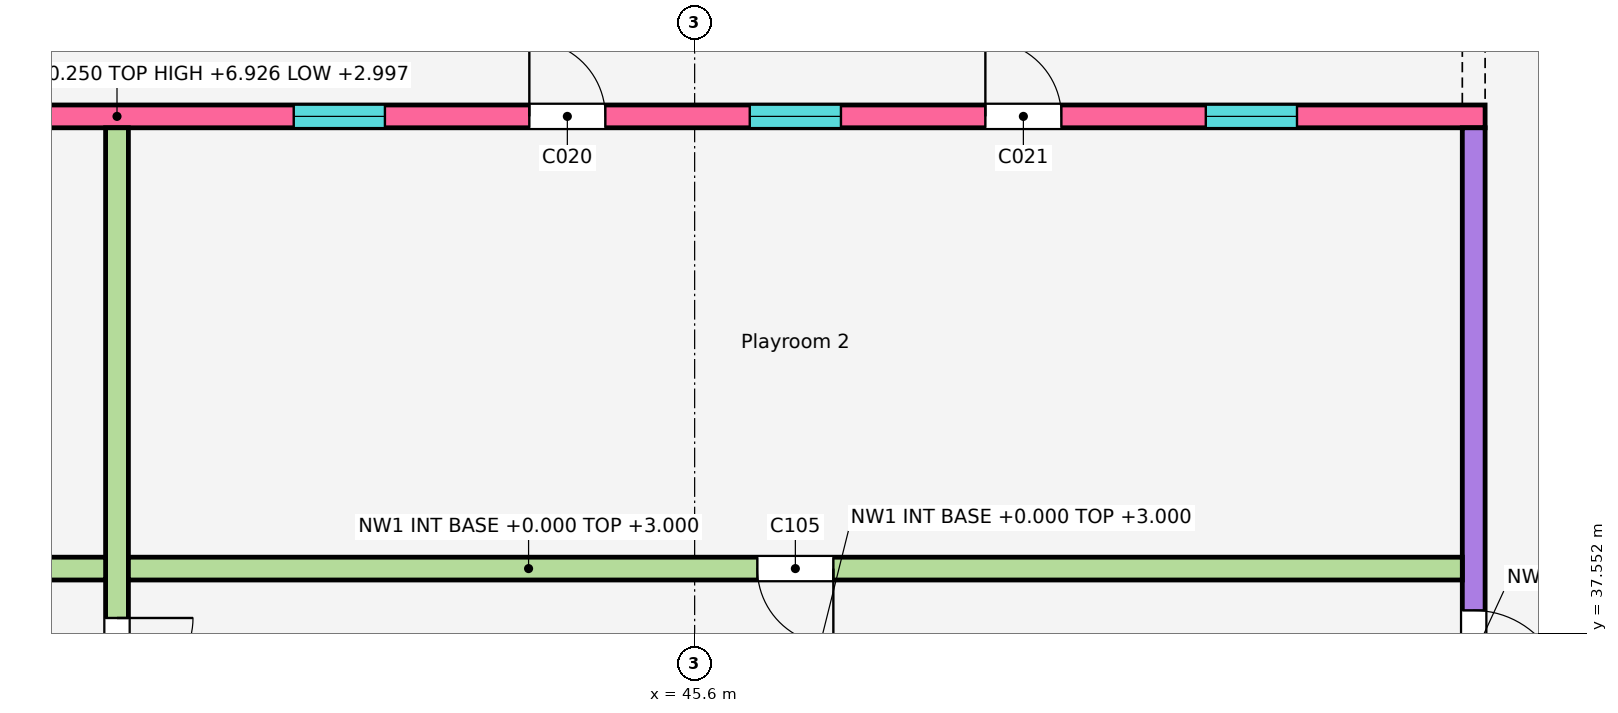
"""IFC4 building model, lengths in metres.
Left out: names, types, materials, properties, quantities, classifications, styles, units other than length and angle.
Written with IfcOpenShell. Run it as: python <this file> out.ifc"""

import sys

from ifc_helpers import new_model, si_unit, direction, frame, frame_2d, origin, place, context, subcontext, project, spatial, polyline, rectangle, outline, extrude, element, fill, save


model = new_model("IFC4")
c1 = context("Model", 3, precision=1e-05, world=origin(), true_north=direction((0.0, 1.0)))
c2 = subcontext(c1, "Body", "Model", "MODEL_VIEW")
j1 = project(units=[si_unit("LENGTHUNIT", "METRE"), si_unit("PLANEANGLEUNIT", "RADIAN")], contexts=[c1])
p1 = place(None, origin())
s1 = spatial("IfcSite", under=j1, at=p1, CompositionType="ELEMENT")
p2 = place(p1, origin())
s2 = spatial("IfcBuilding", under=s1, at=p2, CompositionType="ELEMENT")
p3 = place(p2, origin())
s3 = spatial("IfcBuildingStorey", under=s2, at=p3, CompositionType="ELEMENT", Elevation=0.0)
p4 = place(p3, frame((20.0, 44.35, -0.25), z_axis=(0.0, 0.0, 1.0), x_axis=(1.0, 0.0, 0.0)))
e1 = element("IfcWall", 1, at=p4, inside=s3, PredefinedType="SOLIDWALL", context=c2, shape_type="SweptSolid", body=[
    extrude(outline(polyline([(0.0, 0.0), (36.0, 0.0), (36.0, 3.247), (35.85, 3.247), (27.425, 7.176), (26.425, 7.176), (18.0, 3.247), (9.575, 7.176), (8.575, 7.176), (0.15, 3.247), (0.0, 3.247), (0.0, 0.0)])), frame((0.0, 0.15, 0.0), z_axis=(0.0, -1.0, 0.0), x_axis=(1.0, 0.0, 0.0)), (0.0, 0.0, 1.0), 0.3),
])
p5 = place(p4, frame((2.475, 0.0, 0.85)))
e2 = element("IfcOpeningElement", 2, at=p5, cuts=e1, PredefinedType="OPENING", context=c2, shape_type="SweptSolid", body=[
    extrude(rectangle(XDim=1.2, YDim=1.2, at=frame_2d((0.6, 0.6))), frame((0.0, 0.16, 0.0), z_axis=(0.0, -1.0, 0.0), x_axis=(1.0, 0.0, 0.0)), (0.0, 0.0, 1.0), 0.32),
])
p6 = place(p4, frame((8.475, 0.0, 0.85)))
e3 = element("IfcOpeningElement", 3, at=p6, cuts=e1, PredefinedType="OPENING", context=c2, shape_type="SweptSolid", body=[
    extrude(rectangle(XDim=1.2, YDim=1.2, at=frame_2d((0.6, 0.6))), frame((0.0, 0.16, 0.0), z_axis=(0.0, -1.0, 0.0), x_axis=(1.0, 0.0, 0.0)), (0.0, 0.0, 1.0), 0.32),
])
p7 = place(p4, frame((14.475, 0.0, 0.85)))
e4 = element("IfcOpeningElement", 4, at=p7, cuts=e1, PredefinedType="OPENING", context=c2, shape_type="SweptSolid", body=[
    extrude(rectangle(XDim=1.2, YDim=1.2, at=frame_2d((0.6, 0.6))), frame((0.0, 0.16, 0.0), z_axis=(0.0, -1.0, 0.0), x_axis=(1.0, 0.0, 0.0)), (0.0, 0.0, 1.0), 0.32),
])
p8 = place(p4, frame((5.575, 0.0, 0.25)))
e5 = element("IfcOpeningElement", 5, at=p8, cuts=e1, PredefinedType="OPENING", context=c2, shape_type="SweptSolid", body=[
    extrude(rectangle(XDim=1.0, YDim=2.1, at=frame_2d((0.5, 1.05))), frame((0.0, 0.16, 0.0), z_axis=(0.0, -1.0, 0.0), x_axis=(1.0, 0.0, 0.0)), (0.0, 0.0, 1.0), 0.32),
])
p9 = place(p4, frame((11.575, 0.0, 0.25)))
e6 = element("IfcOpeningElement", 6, at=p9, cuts=e1, PredefinedType="OPENING", context=c2, shape_type="SweptSolid", body=[
    extrude(rectangle(XDim=1.0, YDim=2.1, at=frame_2d((0.5, 1.05))), frame((0.0, 0.16, 0.0), z_axis=(0.0, -1.0, 0.0), x_axis=(1.0, 0.0, 0.0)), (0.0, 0.0, 1.0), 0.32),
])
p10 = place(p4, frame((20.325, 0.0, 0.85)))
e7 = element("IfcOpeningElement", 7, at=p10, cuts=e1, PredefinedType="OPENING", context=c2, shape_type="SweptSolid", body=[
    extrude(rectangle(XDim=1.2, YDim=1.2, at=frame_2d((0.6, 0.6))), frame((0.0, 0.16, 0.0), z_axis=(0.0, -1.0, 0.0), x_axis=(1.0, 0.0, 0.0)), (0.0, 0.0, 1.0), 0.32),
])
p11 = place(p4, frame((26.325, 0.0, 0.85)))
e8 = element("IfcOpeningElement", 8, at=p11, cuts=e1, PredefinedType="OPENING", context=c2, shape_type="SweptSolid", body=[
    extrude(rectangle(XDim=1.2, YDim=1.2, at=frame_2d((0.6, 0.6))), frame((0.0, 0.16, 0.0), z_axis=(0.0, -1.0, 0.0), x_axis=(1.0, 0.0, 0.0)), (0.0, 0.0, 1.0), 0.32),
])
p12 = place(p4, frame((32.325, 0.0, 0.85)))
e9 = element("IfcOpeningElement", 9, at=p12, cuts=e1, PredefinedType="OPENING", context=c2, shape_type="SweptSolid", body=[
    extrude(rectangle(XDim=1.2, YDim=1.2, at=frame_2d((0.6, 0.6))), frame((0.0, 0.16, 0.0), z_axis=(0.0, -1.0, 0.0), x_axis=(1.0, 0.0, 0.0)), (0.0, 0.0, 1.0), 0.32),
])
p13 = place(p4, frame((23.425, 0.0, 0.25)))
e10 = element("IfcOpeningElement", 10, at=p13, cuts=e1, PredefinedType="OPENING", context=c2, shape_type="SweptSolid", body=[
    extrude(rectangle(XDim=1.0, YDim=2.1, at=frame_2d((0.5, 1.05))), frame((0.0, 0.16, 0.0), z_axis=(0.0, -1.0, 0.0), x_axis=(1.0, 0.0, 0.0)), (0.0, 0.0, 1.0), 0.32),
])
p14 = place(p4, frame((29.425, 0.0, 0.25)))
e11 = element("IfcOpeningElement", 11, at=p14, cuts=e1, PredefinedType="OPENING", context=c2, shape_type="SweptSolid", body=[
    extrude(rectangle(XDim=1.0, YDim=2.1, at=frame_2d((0.5, 1.05))), frame((0.0, 0.16, 0.0), z_axis=(0.0, -1.0, 0.0), x_axis=(1.0, 0.0, 0.0)), (0.0, 0.0, 1.0), 0.32),
])
p15 = place(p3, frame((55.85, 30.3, -0.25), z_axis=(0.0, 0.0, 1.0), x_axis=(0.0, 1.0, 0.0)))
e12 = element("IfcWall", 12, at=p15, inside=s3, PredefinedType="SOLIDWALL", context=c2, shape_type="SweptSolid", body=[
    extrude(rectangle(XDim=13.9, YDim=0.3, at=frame_2d((6.95, 0.0))), origin(), (0.0, 0.0, 1.0), 3.25),
])
p16 = place(p15, frame((6.35, 0.0, 0.25)))
e13 = element("IfcOpeningElement", 13, at=p16, cuts=e12, PredefinedType="OPENING", context=c2, shape_type="SweptSolid", body=[
    extrude(rectangle(XDim=1.2, YDim=2.1, at=frame_2d((0.6, 1.05))), frame((0.0, 0.16, 0.0), z_axis=(0.0, -1.0, 0.0), x_axis=(1.0, 0.0, 0.0)), (0.0, 0.0, 1.0), 0.32),
])
p17 = place(p3, frame((38.0, 30.3, -0.25), z_axis=(0.0, 0.0, 1.0), x_axis=(0.0, 1.0, 0.0)))
e14 = element("IfcWall", 14, at=p17, inside=s3, PredefinedType="SOLIDWALL", context=c2, shape_type="SweptSolid", body=[
    extrude(rectangle(XDim=13.9, YDim=0.3, at=frame_2d((6.95, 0.0))), origin(), (0.0, 0.0, 1.0), 3.25),
])
p18 = place(p17, frame((6.45, 0.0, 0.25)))
e15 = element("IfcOpeningElement", 15, at=p18, cuts=e14, PredefinedType="OPENING", context=c2, shape_type="SweptSolid", body=[
    extrude(rectangle(XDim=1.0, YDim=2.1, at=frame_2d((0.5, 1.05))), frame((0.0, 0.16, 0.0), z_axis=(0.0, -1.0, 0.0), x_axis=(1.0, 0.0, 0.0)), (0.0, 0.0, 1.0), 0.32),
])
p19 = place(p3, frame((20.3, 38.4, 0.0), z_axis=(0.0, 0.0, 1.0), x_axis=(1.0, 0.0, 0.0)))
e16 = element("IfcWall", 16, at=p19, inside=s3, PredefinedType="SOLIDWALL", context=c2, shape_type="SweptSolid", body=[
    extrude(rectangle(XDim=17.55, YDim=0.3, at=frame_2d((8.775, 0.0))), origin(), (0.0, 0.0, 1.0), 3.0),
])
p20 = place(p19, frame((8.275, 0.0, 0.0)))
e17 = element("IfcOpeningElement", 17, at=p20, cuts=e16, PredefinedType="OPENING", context=c2, shape_type="SweptSolid", body=[
    extrude(rectangle(XDim=1.0, YDim=2.1, at=frame_2d((0.5, 1.05))), frame((0.0, 0.16, 0.0), z_axis=(0.0, -1.0, 0.0), x_axis=(1.0, 0.0, 0.0)), (0.0, 0.0, 1.0), 0.32),
])
p21 = place(p3, frame((38.15, 38.4, 0.0), z_axis=(0.0, 0.0, 1.0), x_axis=(1.0, 0.0, 0.0)))
e18 = element("IfcWall", 18, at=p21, inside=s3, PredefinedType="SOLIDWALL", context=c2, shape_type="SweptSolid", body=[
    extrude(rectangle(XDim=17.55, YDim=0.3, at=frame_2d((8.775, 0.0))), origin(), (0.0, 0.0, 1.0), 3.0),
])
p22 = place(p21, frame((8.275, 0.0, 0.0)))
e19 = element("IfcOpeningElement", 19, at=p22, cuts=e18, PredefinedType="OPENING", context=c2, shape_type="SweptSolid", body=[
    extrude(rectangle(XDim=1.0, YDim=2.1, at=frame_2d((0.5, 1.05))), frame((0.0, 0.16, 0.0), z_axis=(0.0, -1.0, 0.0), x_axis=(1.0, 0.0, 0.0)), (0.0, 0.0, 1.0), 0.32),
])
p23 = place(p10, origin())
e20 = element("IfcWindow", 20, at=p23, inside=s3, PartitioningType="SINGLE_PANEL", PredefinedType="WINDOW", context=c2, shape_type="SweptSolid", body=[
    extrude(rectangle(XDim=1.2, YDim=1.2, at=frame_2d((0.6, 0.6))), frame((0.0, 0.03, 0.0), z_axis=(0.0, -1.0, 0.0), x_axis=(1.0, 0.0, 0.0)), (0.0, 0.0, 1.0), 0.06),
])
fill(e7, e20)
p24 = place(p11, origin())
e21 = element("IfcWindow", 21, at=p24, inside=s3, PartitioningType="SINGLE_PANEL", PredefinedType="WINDOW", context=c2, shape_type="SweptSolid", body=[
    extrude(rectangle(XDim=1.2, YDim=1.2, at=frame_2d((0.6, 0.6))), frame((0.0, 0.03, 0.0), z_axis=(0.0, -1.0, 0.0), x_axis=(1.0, 0.0, 0.0)), (0.0, 0.0, 1.0), 0.06),
])
fill(e8, e21)
p25 = place(p12, origin())
e22 = element("IfcWindow", 22, at=p25, inside=s3, PartitioningType="SINGLE_PANEL", PredefinedType="WINDOW", context=c2, shape_type="SweptSolid", body=[
    extrude(rectangle(XDim=1.2, YDim=1.2, at=frame_2d((0.6, 0.6))), frame((0.0, 0.03, 0.0), z_axis=(0.0, -1.0, 0.0), x_axis=(1.0, 0.0, 0.0)), (0.0, 0.0, 1.0), 0.06),
])
fill(e9, e22)
p26 = place(p13, origin())
e23 = element("IfcDoor", 23, at=p26, inside=s3, OperationType="SINGLE_SWING_LEFT", PredefinedType="DOOR", context=c2, shape_type="SweptSolid", body=[
    extrude(rectangle(XDim=1.0, YDim=2.1, at=frame_2d((0.5, 1.05))), frame((0.0, 0.025, 0.0), z_axis=(0.0, -1.0, 0.0), x_axis=(1.0, 0.0, 0.0)), (0.0, 0.0, 1.0), 0.05),
])
fill(e10, e23)
p27 = place(p14, origin())
e24 = element("IfcDoor", 24, at=p27, inside=s3, OperationType="SINGLE_SWING_LEFT", PredefinedType="DOOR", context=c2, shape_type="SweptSolid", body=[
    extrude(rectangle(XDim=1.0, YDim=2.1, at=frame_2d((0.5, 1.05))), frame((0.0, 0.025, 0.0), z_axis=(0.0, -1.0, 0.0), x_axis=(1.0, 0.0, 0.0)), (0.0, 0.0, 1.0), 0.05),
])
fill(e11, e24)
p28 = place(p16, frame((1.2, 0.0, 0.0), z_axis=(0.0, 0.0, 1.0), x_axis=(-1.0, 0.0, 0.0)))
e25 = element("IfcDoor", 25, at=p28, inside=s3, OperationType="SINGLE_SWING_RIGHT", PredefinedType="DOOR", context=c2, shape_type="SweptSolid", body=[
    extrude(rectangle(XDim=1.2, YDim=2.1, at=frame_2d((0.6, 1.05))), frame((0.0, 0.025, 0.0), z_axis=(0.0, -1.0, 0.0), x_axis=(1.0, 0.0, 0.0)), (0.0, 0.0, 1.0), 0.05),
])
fill(e13, e25)
p29 = place(p22, origin())
e26 = element("IfcDoor", 26, at=p29, inside=s3, OperationType="SINGLE_SWING_RIGHT", PredefinedType="DOOR", context=c2, shape_type="SweptSolid", body=[
    extrude(rectangle(XDim=1.0, YDim=2.1, at=frame_2d((0.5, 1.05))), frame((0.0, 0.025, 0.0), z_axis=(0.0, -1.0, 0.0), x_axis=(1.0, 0.0, 0.0)), (0.0, 0.0, 1.0), 0.05),
])
fill(e19, e26)
p30 = place(p18, origin())
e27 = element("IfcDoor", 27, at=p30, inside=s3, OperationType="SINGLE_SWING_RIGHT", PredefinedType="DOOR", context=c2, shape_type="SweptSolid", body=[
    extrude(rectangle(XDim=1.0, YDim=2.1, at=frame_2d((0.5, 1.05))), frame((0.0, 0.025, 0.0), z_axis=(0.0, -1.0, 0.0), x_axis=(1.0, 0.0, 0.0)), (0.0, 0.0, 1.0), 0.05),
])
fill(e15, e27)
save(model, sys.argv[1])
